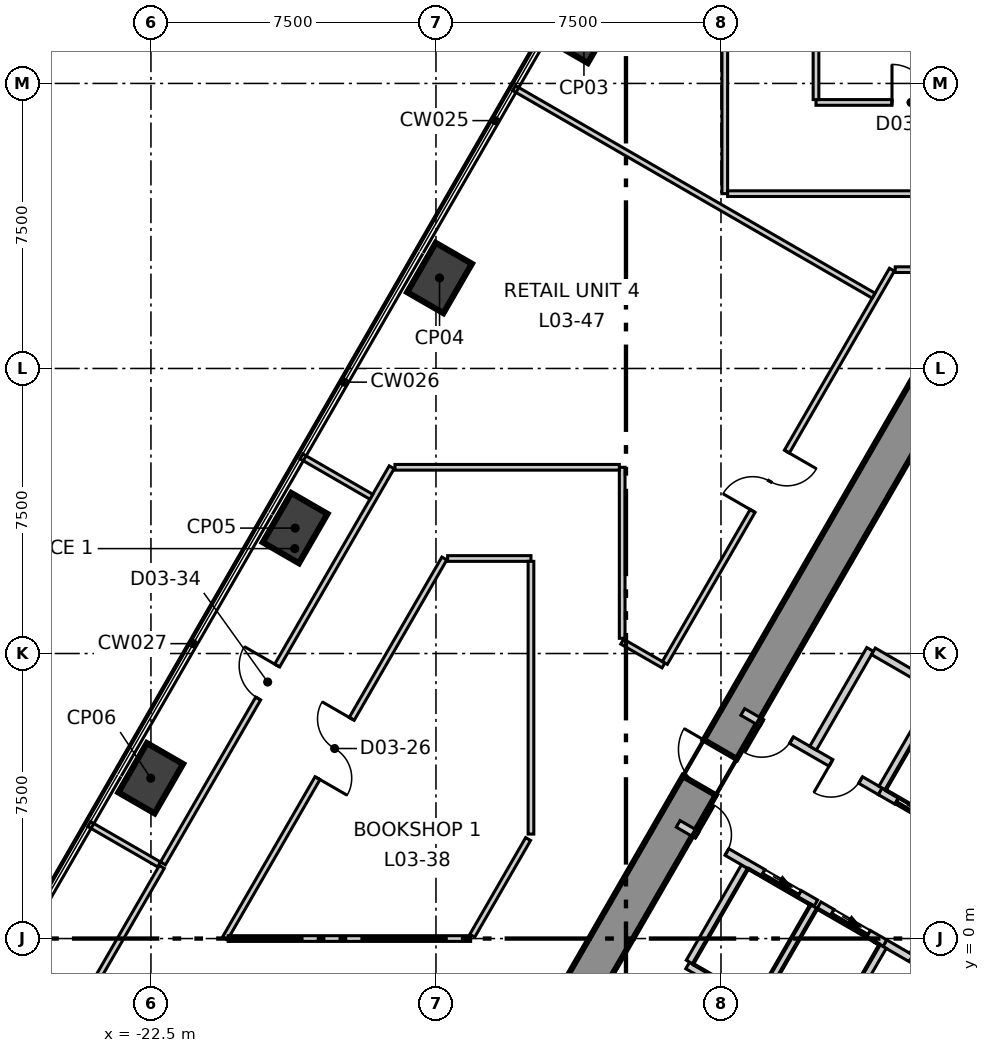
"""IFC4 building model, lengths in metres.
Left out: names, types, materials, properties, quantities, classifications, styles, units other than length and angle.
Written with IfcOpenShell. Run it as: python <this file> out.ifc"""

import sys

from ifc_helpers import new_model, si_unit, direction, frame, frame_2d, origin, origin_2d, place, context, subcontext, project, spatial, polyline, rectangle, outline, extrude, element, fill, save


model = new_model("IFC4")
c1 = context("Model", 3, precision=1e-05, world=origin(), true_north=direction((0.0, 1.0)))
c2 = subcontext(c1, "Body", "Model", "MODEL_VIEW")
j1 = project(units=[si_unit("LENGTHUNIT", "METRE"), si_unit("PLANEANGLEUNIT", "RADIAN")], contexts=[c1])
p1 = place(None, origin())
s1 = spatial("IfcSite", under=j1, at=p1, CompositionType="ELEMENT")
p2 = place(p1, origin())
s2 = spatial("IfcBuilding", under=s1, at=p2, CompositionType="ELEMENT")
p3 = place(p2, frame((0.0, 0.0, 19.9)))
s3 = spatial("IfcBuildingStorey", under=s2, at=p3, CompositionType="ELEMENT", Elevation=19.9)
p4 = place(p3, frame((-1.617, 15.2, -0.4), z_axis=(0.0, 0.0, 1.0), x_axis=(-0.499992141631, -0.866029940768, 0.0)))
e1 = element("IfcWall", 1, at=p4, inside=s3, PredefinedType="SHEAR", context=c2, shape_type="SweptSolid", body=[
    extrude(outline(polyline([(-0.289, -0.499), (1.656, -0.499), (3.601, -0.499), (5.547, -0.499), (7.492, -0.499), (9.437, -0.5), (11.382, -0.5), (13.328, -0.5), (15.273, -0.5), (17.218, -0.5), (19.163, -0.5), (21.109, -0.5), (23.054, -0.5), (24.999, -0.5), (24.422, 0.5), (22.566, 0.5), (20.709, 0.5), (18.853, 0.5), (16.997, 0.5), (15.14, 0.5), (13.284, 0.5), (11.427, 0.5), (9.571, 0.5), (7.715, 0.5), (5.858, 0.5), (4.002, 0.5), (2.146, 0.5), (0.289, 0.5), (-0.289, -0.499)])), origin(), (0.0, 0.0, 1.0), 5.4),
])
p5 = place(p4, frame((11.805, 0.0, 0.4)))
e2 = element("IfcOpeningElement", 2, at=p5, cuts=e1, PredefinedType="OPENING", context=c2, shape_type="SweptSolid", body=[
    extrude(rectangle(XDim=1.1, YDim=2.1, at=frame_2d((0.55, 1.05))), frame((0.0, 0.51, 0.0), z_axis=(0.0, -1.0, 0.0), x_axis=(1.0, 0.0, 0.0)), (0.0, 0.0, 1.0), 1.02),
])
for number, where, z_axis, x_axis in (
    (3, (-11.106, 23.962, -0.4), (0.0, 0.0, 1.0), (0.5, 0.866, 0.0)),
    (4, (-14.906, 17.381, -0.4), (0.0, 0.0, 1.0), (0.5, 0.866, 0.0)),
    (5, (-18.706, 10.8, -0.4), (0.0, 0.0, 1.0), (0.5, 0.866, 0.0)),
    (6, (-22.506, 4.219, -0.4), (0.0, 0.0, 1.0), (0.5, 0.866, 0.0)),
):
    element("IfcColumn", number, at=place(p3, frame(where, z_axis=z_axis, x_axis=x_axis)), inside=s3, PredefinedType="COLUMN", context=c2, shape_type="SweptSolid", body=[
        extrude(rectangle(XDim=1.5, YDim=1.1, at=origin_2d()), origin(), (0.0, 0.0, 1.0), 5.4),
    ])
p6 = place(p3, frame((-24.462, -2.01, 0.0), z_axis=(0.0, 0.0, 1.0), x_axis=(0.499835244236, 0.866120504675, 0.0)))
e7 = element("IfcWall", 7, at=p6, inside=s3, PredefinedType="PARTITIONING", context=c2, shape_type="SweptSolid", body=[
    extrude(rectangle(XDim=4.497, YDim=0.15, at=frame_2d((2.249, 0.0))), origin(), (0.0, 0.0, 1.0), 5.0),
])
p7 = place(p3, frame((-24.126, 3.012, 0.0), z_axis=(0.0, 0.0, 1.0), x_axis=(0.86609948408, -0.499871667208, 0.0)))
e8 = element("IfcWall", 8, at=p7, inside=s3, PredefinedType="PARTITIONING", context=c2, shape_type="SweptSolid", body=[
    extrude(rectangle(XDim=2.125, YDim=0.15, at=frame_2d((1.062, 0.0))), origin(), (0.0, 0.0, 1.0), 5.0),
])
p8 = place(p3, frame((-22.184, 1.977, 0.0), z_axis=(0.0, 0.0, 1.0), x_axis=(0.500026811154, 0.866009923804, 0.0)))
e9 = element("IfcWall", 9, at=p8, inside=s3, PredefinedType="PARTITIONING", context=c2, shape_type="SweptSolid", body=[
    extrude(rectangle(XDim=12.035, YDim=0.15, at=frame_2d((6.018, 0.0))), origin(), (0.0, 0.0, 1.0), 5.0),
])
p9 = place(p8, frame((5.011, 0.0, 0.0)))
e10 = element("IfcOpeningElement", 10, at=p9, cuts=e9, PredefinedType="OPENING", context=c2, shape_type="SweptSolid", body=[
    extrude(rectangle(XDim=1.0, YDim=2.1, at=frame_2d((0.5, 1.05))), frame((0.0, 0.085, 0.0), z_axis=(0.0, -1.0, 0.0), x_axis=(1.0, 0.0, 0.0)), (0.0, 0.0, 1.0), 0.17),
])
p10 = place(p3, frame((-18.541, 12.687, 0.0), z_axis=(0.0, 0.0, 1.0), x_axis=(0.866015377534, -0.500017365573, 0.0)))
e11 = element("IfcWall", 11, at=p10, inside=s3, PredefinedType="PARTITIONING", context=c2, shape_type="SweptSolid", body=[
    extrude(rectangle(XDim=2.126, YDim=0.15, at=frame_2d((1.063, 0.0))), origin(), (0.0, 0.0, 1.0), 5.0),
])
p11 = place(p3, frame((-10.1, 7.813, 0.0), z_axis=(0.0, 0.0, 1.0), x_axis=(0.866415685352, -0.499323402392, 0.0)))
e12 = element("IfcWall", 12, at=p11, inside=s3, PredefinedType="PARTITIONING", context=c2, shape_type="SweptSolid", body=[
    extrude(rectangle(XDim=1.254, YDim=0.15, at=frame_2d((0.627, 0.0))), origin(), (0.0, 0.0, 1.0), 5.0),
])
p12 = place(p3, frame((-8.977, 7.252, 0.0), z_axis=(0.0, 0.0, 1.0), x_axis=(0.500037258536, 0.86600389149, 0.0)))
e13 = element("IfcWall", 13, at=p12, inside=s3, PredefinedType="PARTITIONING", context=c2, shape_type="SweptSolid", body=[
    extrude(rectangle(XDim=11.949, YDim=0.15, at=frame_2d((5.975, 0.0))), origin(), (0.0, 0.0, 1.0), 5.0),
])
p13 = place(p12, frame((4.62, 0.0, 0.0)))
e14 = element("IfcOpeningElement", 14, at=p13, cuts=e13, PredefinedType="OPENING", context=c2, shape_type="SweptSolid", body=[
    extrude(rectangle(XDim=1.8, YDim=2.1, at=frame_2d((0.9, 1.05))), frame((0.0, 0.085, 0.0), z_axis=(0.0, -1.0, 0.0), x_axis=(1.0, 0.0, 0.0)), (0.0, 0.0, 1.0), 0.17),
])
p14 = place(p3, frame((-10.1, 7.9, 0.0), z_axis=(0.0, 0.0, 1.0), x_axis=(0.0, 1.0, 0.0)))
e15 = element("IfcWall", 15, at=p14, inside=s3, PredefinedType="PARTITIONING", context=c2, shape_type="SweptSolid", body=[
    extrude(rectangle(XDim=4.5, YDim=0.15, at=frame_2d((2.25, 0.0))), origin(), (0.0, 0.0, 1.0), 5.0),
])
p15 = place(p3, frame((-16.079, 12.4, 0.0), z_axis=(0.0, 0.0, 1.0), x_axis=(1.0, 0.0, 0.0)))
e16 = element("IfcWall", 16, at=p15, inside=s3, PredefinedType="PARTITIONING", context=c2, shape_type="SweptSolid", body=[
    extrude(rectangle(XDim=5.904, YDim=0.15, at=frame_2d((2.952, 0.0))), origin(), (0.0, 0.0, 1.0), 5.0),
])
p16 = place(p3, frame((-12.945, 22.378, 0.0), z_axis=(0.0, 0.0, 1.0), x_axis=(0.866045288938, -0.499965556321, 0.0)))
e17 = element("IfcWall", 17, at=p16, inside=s3, PredefinedType="PARTITIONING", context=c2, shape_type="SweptSolid", body=[
    extrude(rectangle(XDim=10.925, YDim=0.15, at=frame_2d((5.462, 0.0))), origin(), (0.0, 0.0, 1.0), 5.0),
])
p17 = place(p3, frame((-7.4, 19.6, 0.0), z_axis=(0.0, 0.0, 1.0), x_axis=(0.0, 1.0, 0.0)))
e18 = element("IfcWall", 18, at=p17, inside=s3, PredefinedType="PARTITIONING", context=c2, shape_type="SweptSolid", body=[
    extrude(rectangle(XDim=7.832, YDim=0.15, at=frame_2d((3.916, 0.0))), origin(), (0.0, 0.0, 1.0), 5.0),
])
p18 = place(p3, frame((-7.325, 19.6, 0.0), z_axis=(0.0, 0.0, 1.0), x_axis=(1.0, 0.0, 0.0)))
e19 = element("IfcWall", 19, at=p18, inside=s3, PredefinedType="PARTITIONING", context=c2, shape_type="SweptSolid", body=[
    extrude(rectangle(XDim=15.344, YDim=0.15, at=frame_2d((7.672, 0.0))), origin(), (0.0, 0.0, 1.0), 5.0),
])
p19 = place(p18, frame((7.135, 0.0, 0.0)))
e20 = element("IfcOpeningElement", 20, at=p19, cuts=e19, PredefinedType="OPENING", context=c2, shape_type="SweptSolid", body=[
    extrude(rectangle(XDim=1.0, YDim=2.1, at=frame_2d((0.5, 1.05))), frame((0.0, 0.085, 0.0), z_axis=(0.0, -1.0, 0.0), x_axis=(1.0, 0.0, 0.0)), (0.0, 0.0, 1.0), 0.17),
])
p20 = place(p3, frame((-2.916, 17.6, 0.0), z_axis=(0.0, 0.0, 1.0), x_axis=(1.0, 0.0, 0.0)))
e21 = element("IfcWall", 21, at=p20, inside=s3, PredefinedType="PARTITIONING", context=c2, shape_type="SweptSolid", body=[
    extrude(rectangle(XDim=5.832, YDim=0.15, at=frame_2d((2.916, 0.0))), origin(), (0.0, 0.0, 1.0), 5.0),
])
p21 = place(p3, frame((-5.0, 22.0, 0.0), z_axis=(0.0, 0.0, 1.0), x_axis=(1.0, 0.0, 0.0)))
e22 = element("IfcWall", 22, at=p21, inside=s3, PredefinedType="PARTITIONING", context=c2, shape_type="SweptSolid", body=[
    extrude(rectangle(XDim=10.925, YDim=0.15, at=frame_2d((5.462, 0.0))), origin(), (0.0, 0.0, 1.0), 5.0),
])
p22 = place(p21, frame((2.0, 0.0, 0.0)))
e23 = element("IfcOpeningElement", 23, at=p22, cuts=e22, PredefinedType="OPENING", context=c2, shape_type="SweptSolid", body=[
    extrude(rectangle(XDim=1.0, YDim=2.1, at=frame_2d((0.5, 1.05))), frame((0.0, 0.085, 0.0), z_axis=(0.0, -1.0, 0.0), x_axis=(1.0, 0.0, 0.0)), (0.0, 0.0, 1.0), 0.17),
])
p23 = place(p21, frame((7.5, 0.0, 0.0)))
e24 = element("IfcOpeningElement", 24, at=p23, cuts=e22, PredefinedType="OPENING", context=c2, shape_type="SweptSolid", body=[
    extrude(rectangle(XDim=1.0, YDim=2.1, at=frame_2d((0.5, 1.05))), frame((0.0, 0.085, 0.0), z_axis=(0.0, -1.0, 0.0), x_axis=(1.0, 0.0, 0.0)), (0.0, 0.0, 1.0), 0.17),
])
p24 = place(p3, frame((-5.0, 22.075, 0.0), z_axis=(0.0, 0.0, 1.0), x_axis=(0.0, 1.0, 0.0)))
e25 = element("IfcWall", 25, at=p24, inside=s3, PredefinedType="PARTITIONING", context=c2, shape_type="SweptSolid", body=[
    extrude(rectangle(XDim=4.864, YDim=0.15, at=frame_2d((2.432, 0.0))), origin(), (0.0, 0.0, 1.0), 4.25),
])
p25 = place(p3, frame((-20.554, 0.0, 0.0), z_axis=(0.0, 0.0, 1.0), x_axis=(0.500027479704, 0.866009537788, 0.0)))
e26 = element("IfcWall", 26, at=p25, inside=s3, PredefinedType="PARTITIONING", context=c2, shape_type="SweptSolid", body=[
    extrude(rectangle(XDim=11.547, YDim=0.15, at=frame_2d((5.773, 0.0))), origin(), (0.0, 0.0, 1.0), 5.0),
])
p26 = place(p25, frame((4.874, 0.0, 0.0)))
e27 = element("IfcOpeningElement", 27, at=p26, cuts=e26, PredefinedType="OPENING", context=c2, shape_type="SweptSolid", body=[
    extrude(rectangle(XDim=1.8, YDim=2.1, at=frame_2d((0.9, 1.05))), frame((0.0, 0.085, 0.0), z_axis=(0.0, -1.0, 0.0), x_axis=(1.0, 0.0, 0.0)), (0.0, 0.0, 1.0), 0.17),
])
p27 = place(p3, frame((-20.467, 0.0, 0.0), z_axis=(0.0, 0.0, 1.0), x_axis=(1.0, 0.0, 0.0)))
e28 = element("IfcWall", 28, at=p27, inside=s3, PredefinedType="PARTITIONING", context=c2, shape_type="SweptSolid", body=[
    extrude(rectangle(XDim=6.38, YDim=0.15, at=frame_2d((3.19, 0.0))), origin(), (0.0, 0.0, 1.0), 5.0),
])
p28 = place(p3, frame((-14.693, 10.0, 0.0), z_axis=(0.0, 0.0, 1.0), x_axis=(1.0, 0.0, 0.0)))
e29 = element("IfcWall", 29, at=p28, inside=s3, PredefinedType="PARTITIONING", context=c2, shape_type="SweptSolid", body=[
    extrude(rectangle(XDim=2.193, YDim=0.15, at=frame_2d((1.097, 0.0))), origin(), (0.0, 0.0, 1.0), 5.0),
])
p29 = place(p3, frame((-12.5, 2.749, 0.0), z_axis=(0.0, 0.0, 1.0), x_axis=(0.0, 1.0, 0.0)))
e30 = element("IfcWall", 30, at=p29, inside=s3, PredefinedType="PARTITIONING", context=c2, shape_type="SweptSolid", body=[
    extrude(rectangle(XDim=7.176, YDim=0.15, at=frame_2d((3.588, 0.0))), origin(), (0.0, 0.0, 1.0), 5.0),
])
p30 = place(p3, frame((-14.044, 0.075, 0.0), z_axis=(0.0, 0.0, 1.0), x_axis=(0.500062965414, 0.865989047634, 0.0)))
e31 = element("IfcWall", 31, at=p30, inside=s3, PredefinedType="PARTITIONING", context=c2, shape_type="SweptSolid", body=[
    extrude(rectangle(XDim=2.938, YDim=0.15, at=frame_2d((1.469, 0.0))), origin(), (0.0, 0.0, 1.0), 5.0),
])
p31 = place(p3, frame((-8.376, -0.707, 0.0), z_axis=(0.0, 0.0, 1.0), x_axis=(0.866067520717, -0.499927044236, 0.0)))
e32 = element("IfcWall", 32, at=p31, inside=s3, PredefinedType="SOLIDWALL", context=c2, shape_type="SweptSolid", body=[
    extrude(rectangle(XDim=2.1, YDim=0.2, at=frame_2d((1.05, 0.0))), origin(), (0.0, 0.0, 1.0), 5.0),
])
p32 = place(p3, frame((-8.326, -0.62, 0.0), z_axis=(0.0, 0.0, 1.0), x_axis=(0.500023687443, 0.866011727401, 0.0)))
e33 = element("IfcWall", 33, at=p32, inside=s3, PredefinedType="SOLIDWALL", context=c2, shape_type="SweptSolid", body=[
    extrude(rectangle(XDim=2.9, YDim=0.2, at=frame_2d((1.45, 0.0))), origin(), (0.0, 0.0, 1.0), 5.0),
])
p33 = place(p3, frame((-8.627, 3.018, 0.0), z_axis=(0.0, 0.0, 1.0), x_axis=(0.866039775641, -0.499975106388, 0.0)))
e34 = element("IfcWall", 34, at=p33, inside=s3, PredefinedType="SOLIDWALL", context=c2, shape_type="SweptSolid", body=[
    extrude(rectangle(XDim=4.182, YDim=0.2, at=frame_2d((2.091, 0.0))), origin(), (0.0, 0.0, 1.0), 5.0),
])
p34 = place(p33, frame((2.58, 0.0, 0.0)))
e35 = element("IfcOpeningElement", 35, at=p34, cuts=e34, PredefinedType="OPENING", context=c2, shape_type="SweptSolid", body=[
    extrude(rectangle(XDim=1.1, YDim=2.1, at=frame_2d((0.55, 1.05))), frame((0.0, 0.11, 0.0), z_axis=(0.0, -1.0, 0.0), x_axis=(1.0, 0.0, 0.0)), (0.0, 0.0, 1.0), 0.22),
])
p35 = place(p33, frame((0.58, 0.0, 0.0)))
e36 = element("IfcOpeningElement", 36, at=p35, cuts=e34, PredefinedType="OPENING", context=c2, shape_type="SweptSolid", body=[
    extrude(rectangle(XDim=0.9, YDim=2.1, at=frame_2d((0.45, 1.05))), frame((0.0, 0.11, 0.0), z_axis=(0.0, -1.0, 0.0), x_axis=(1.0, 0.0, 0.0)), (0.0, 0.0, 1.0), 0.22),
])
p36 = place(p3, frame((-3.188, -0.122, 0.0), z_axis=(0.0, 0.0, 1.0), x_axis=(0.865705793592, -0.50055317294, 0.0)))
e37 = element("IfcWall", 37, at=p36, inside=s3, PredefinedType="SOLIDWALL", context=c2, shape_type="SweptSolid", body=[
    extrude(rectangle(XDim=0.797, YDim=0.2, at=frame_2d((0.398, 0.0))), origin(), (0.0, 0.0, 1.0), 5.0),
])
p37 = place(p3, frame((-6.927, 5.962, 0.0), z_axis=(0.0, 0.0, 1.0), x_axis=(0.866065051207, -0.49993132236, 0.0)))
e38 = element("IfcWall", 38, at=p37, inside=s3, PredefinedType="SOLIDWALL", context=c2, shape_type="SweptSolid", body=[
    extrude(rectangle(XDim=4.182, YDim=0.2, at=frame_2d((2.091, 0.0))), origin(), (0.0, 0.0, 1.0), 5.0),
])
p38 = place(p37, frame((2.68, 0.0, 0.0)))
e39 = element("IfcOpeningElement", 39, at=p38, cuts=e38, PredefinedType="OPENING", context=c2, shape_type="SweptSolid", body=[
    extrude(rectangle(XDim=0.9, YDim=2.1, at=frame_2d((0.45, 1.05))), frame((0.0, 0.11, 0.0), z_axis=(0.0, -1.0, 0.0), x_axis=(1.0, 0.0, 0.0)), (0.0, 0.0, 1.0), 0.22),
])
p39 = place(p37, frame((0.58, 0.0, 0.0)))
e40 = element("IfcOpeningElement", 40, at=p39, cuts=e38, PredefinedType="OPENING", context=c2, shape_type="SweptSolid", body=[
    extrude(rectangle(XDim=0.9, YDim=2.1, at=frame_2d((0.45, 1.05))), frame((0.0, 0.11, 0.0), z_axis=(0.0, -1.0, 0.0), x_axis=(1.0, 0.0, 0.0)), (0.0, 0.0, 1.0), 0.22),
])
p40 = place(p3, frame((-5.076, 5.009, 0.0), z_axis=(0.0, 0.0, 1.0), x_axis=(0.50002537861, 0.866010750942, 0.0)))
e41 = element("IfcWall", 41, at=p40, inside=s3, PredefinedType="SOLIDWALL", context=c2, shape_type="SweptSolid", body=[
    extrude(rectangle(XDim=3.0, YDim=0.2, at=frame_2d((1.5, 0.0))), origin(), (0.0, 0.0, 1.0), 5.0),
])
p41 = place(p3, frame((-3.489, 7.557, 0.0), z_axis=(0.0, 0.0, 1.0), x_axis=(0.866010750942, -0.50002537861, 0.0)))
e42 = element("IfcWall", 42, at=p41, inside=s3, PredefinedType="SOLIDWALL", context=c2, shape_type="SweptSolid", body=[
    extrude(rectangle(XDim=2.0, YDim=0.2, at=frame_2d((1.0, 0.0))), origin(), (0.0, 0.0, 1.0), 5.0),
])
p42 = place(p3, frame((-2.444, -0.433, 0.0), z_axis=(0.0, 0.0, 1.0), x_axis=(0.500035624827, 0.866004834804, 0.0)))
e43 = element("IfcWall", 43, at=p42, inside=s3, PredefinedType="SOLIDWALL", context=c2, shape_type="SweptSolid", body=[
    extrude(rectangle(XDim=3.194, YDim=0.2, at=frame_2d((1.597, 0.0))), origin(), (0.0, 0.0, 1.0), 5.0),
])
p43 = place(p3, frame((-6.507, -1.67, 0.0), z_axis=(0.0, 0.0, 1.0), x_axis=(0.50012328804, 0.865954211699, 0.0)))
e44 = element("IfcWall", 44, at=p43, inside=s3, PredefinedType="SOLIDWALL", context=c2, shape_type="SweptSolid", body=[
    extrude(rectangle(XDim=2.9, YDim=0.2, at=frame_2d((1.45, 0.0))), origin(), (0.0, 0.0, 1.0), 5.0),
])
p44 = place(p3, frame((-4.92, 0.878, 0.0), z_axis=(0.0, 0.0, 1.0), x_axis=(0.866010750942, -0.50002537861, 0.0)))
e45 = element("IfcWall", 45, at=p44, inside=s3, PredefinedType="SOLIDWALL", context=c2, shape_type="SweptSolid", body=[
    extrude(rectangle(XDim=2.0, YDim=0.2, at=frame_2d((1.0, 0.0))), origin(), (0.0, 0.0, 1.0), 5.0),
])
p45 = place(p44, frame((0.4, 0.0, 0.0)))
e46 = element("IfcOpeningElement", 46, at=p45, cuts=e45, PredefinedType="OPENING", context=c2, shape_type="SweptSolid", body=[
    extrude(rectangle(XDim=1.1, YDim=2.1, at=frame_2d((0.55, 1.05))), frame((0.0, 0.11, 0.0), z_axis=(0.0, -1.0, 0.0), x_axis=(1.0, 0.0, 0.0)), (0.0, 0.0, 1.0), 0.22),
])
p46 = place(p3, frame((-4.619, -2.6, 0.0), z_axis=(0.0, 0.0, 1.0), x_axis=(0.50009492287, 0.865970593103, 0.0)))
e47 = element("IfcWall", 47, at=p46, inside=s3, PredefinedType="SOLIDWALL", context=c2, shape_type="SweptSolid", body=[
    extrude(rectangle(XDim=2.761, YDim=0.2, at=frame_2d((1.381, 0.0))), origin(), (0.0, 0.0, 1.0), 5.0),
])
p47 = place(p3, frame((-3.309, 3.873, 0.0), z_axis=(0.0, 0.0, 1.0), x_axis=(0.866098583652, -0.499873227325, 0.0)))
e48 = element("IfcWall", 48, at=p47, inside=s3, PredefinedType="SOLIDWALL", context=c2, shape_type="SweptSolid", body=[
    extrude(rectangle(XDim=2.103, YDim=0.2, at=frame_2d((1.051, 0.0))), origin(), (0.0, 0.0, 1.0), 5.0),
])
p48 = place(p47, frame((0.502, 0.0, 0.0)))
e49 = element("IfcOpeningElement", 49, at=p48, cuts=e48, PredefinedType="OPENING", context=c2, shape_type="SweptSolid", body=[
    extrude(rectangle(XDim=1.1, YDim=2.1, at=frame_2d((0.55, 1.05))), frame((0.0, 0.11, 0.0), z_axis=(0.0, -1.0, 0.0), x_axis=(1.0, 0.0, 0.0)), (0.0, 0.0, 1.0), 0.22),
])
p49 = place(p3, frame((-3.257, 3.959, 0.0), z_axis=(0.0, 0.0, 1.0), x_axis=(0.50012328804, 0.865954211699, 0.0)))
e50 = element("IfcWall", 50, at=p49, inside=s3, PredefinedType="SOLIDWALL", context=c2, shape_type="SweptSolid", body=[
    extrude(rectangle(XDim=2.9, YDim=0.2, at=frame_2d((1.45, 0.0))), origin(), (0.0, 0.0, 1.0), 5.0),
])
p50 = place(p45, origin())
e51 = element("IfcDoor", 51, at=p50, inside=s3, OperationType="SLIDING_TO_LEFT", PredefinedType="DOOR", context=c2, shape_type="SweptSolid", body=[
    extrude(rectangle(XDim=1.1, YDim=2.1, at=frame_2d((0.55, 1.05))), frame((0.0, 0.025, 0.0), z_axis=(0.0, -1.0, 0.0), x_axis=(1.0, 0.0, 0.0)), (0.0, 0.0, 1.0), 0.05),
])
fill(e46, e51)
p51 = place(p48, origin())
e52 = element("IfcDoor", 52, at=p51, inside=s3, OperationType="SLIDING_TO_LEFT", PredefinedType="DOOR", context=c2, shape_type="SweptSolid", body=[
    extrude(rectangle(XDim=1.1, YDim=2.1, at=frame_2d((0.55, 1.05))), frame((0.0, 0.025, 0.0), z_axis=(0.0, -1.0, 0.0), x_axis=(1.0, 0.0, 0.0)), (0.0, 0.0, 1.0), 0.05),
])
fill(e49, e52)
p52 = place(p34, origin())
e53 = element("IfcDoor", 53, at=p52, inside=s3, OperationType="SLIDING_TO_LEFT", PredefinedType="DOOR", context=c2, shape_type="SweptSolid", body=[
    extrude(rectangle(XDim=1.1, YDim=2.1, at=frame_2d((0.55, 1.05))), frame((0.0, 0.025, 0.0), z_axis=(0.0, -1.0, 0.0), x_axis=(1.0, 0.0, 0.0)), (0.0, 0.0, 1.0), 0.05),
])
fill(e35, e53)
p53 = place(p38, origin())
e54 = element("IfcDoor", 54, at=p53, inside=s3, OperationType="SINGLE_SWING_LEFT", PredefinedType="DOOR", context=c2, shape_type="SweptSolid", body=[
    extrude(rectangle(XDim=0.9, YDim=2.1, at=frame_2d((0.45, 1.05))), frame((0.0, 0.025, 0.0), z_axis=(0.0, -1.0, 0.0), x_axis=(1.0, 0.0, 0.0)), (0.0, 0.0, 1.0), 0.05),
])
fill(e39, e54)
p54 = place(p26, origin())
e55 = element("IfcDoor", 55, at=p54, inside=s3, OperationType="DOUBLE_DOOR_SINGLE_SWING", PredefinedType="DOOR", context=c2, shape_type="SweptSolid", body=[
    extrude(rectangle(XDim=1.8, YDim=2.1, at=frame_2d((0.9, 1.05))), frame((0.0, 0.025, 0.0), z_axis=(0.0, -1.0, 0.0), x_axis=(1.0, 0.0, 0.0)), (0.0, 0.0, 1.0), 0.05),
])
fill(e27, e55)
p55 = place(p22, origin())
e56 = element("IfcDoor", 56, at=p55, inside=s3, OperationType="SINGLE_SWING_RIGHT", PredefinedType="DOOR", context=c2, shape_type="SweptSolid", body=[
    extrude(rectangle(XDim=1.0, YDim=2.1, at=frame_2d((0.5, 1.05))), frame((0.0, 0.025, 0.0), z_axis=(0.0, -1.0, 0.0), x_axis=(1.0, 0.0, 0.0)), (0.0, 0.0, 1.0), 0.05),
])
fill(e23, e56)
p56 = place(p9, origin())
e57 = element("IfcDoor", 57, at=p56, inside=s3, OperationType="SINGLE_SWING_LEFT", PredefinedType="DOOR", context=c2, shape_type="SweptSolid", body=[
    extrude(rectangle(XDim=1.0, YDim=2.1, at=frame_2d((0.5, 1.05))), frame((0.0, 0.025, 0.0), z_axis=(0.0, -1.0, 0.0), x_axis=(1.0, 0.0, 0.0)), (0.0, 0.0, 1.0), 0.05),
])
fill(e10, e57)
p57 = place(p13, origin())
e58 = element("IfcDoor", 58, at=p57, inside=s3, OperationType="DOUBLE_DOOR_SINGLE_SWING", PredefinedType="DOOR", context=c2, shape_type="SweptSolid", body=[
    extrude(rectangle(XDim=1.8, YDim=2.1, at=frame_2d((0.9, 1.05))), frame((0.0, 0.025, 0.0), z_axis=(0.0, -1.0, 0.0), x_axis=(1.0, 0.0, 0.0)), (0.0, 0.0, 1.0), 0.05),
])
fill(e14, e58)
p58 = place(p5, origin())
e59 = element("IfcDoor", 59, at=p58, inside=s3, OperationType="SINGLE_SWING_LEFT", PredefinedType="DOOR", context=c2, shape_type="SweptSolid", body=[
    extrude(rectangle(XDim=1.1, YDim=2.1, at=frame_2d((0.55, 1.05))), frame((0.0, 0.025, 0.0), z_axis=(0.0, -1.0, 0.0), x_axis=(1.0, 0.0, 0.0)), (0.0, 0.0, 1.0), 0.05),
])
fill(e2, e59)
p59 = place(p35, origin())
e60 = element("IfcDoor", 60, at=p59, inside=s3, OperationType="SINGLE_SWING_RIGHT", PredefinedType="DOOR", context=c2, shape_type="SweptSolid", body=[
    extrude(rectangle(XDim=0.9, YDim=2.1, at=frame_2d((0.45, 1.05))), frame((0.0, 0.025, 0.0), z_axis=(0.0, -1.0, 0.0), x_axis=(1.0, 0.0, 0.0)), (0.0, 0.0, 1.0), 0.05),
])
fill(e36, e60)
p60 = place(p39, origin())
e61 = element("IfcDoor", 61, at=p60, inside=s3, OperationType="SINGLE_SWING_LEFT", PredefinedType="DOOR", context=c2, shape_type="SweptSolid", body=[
    extrude(rectangle(XDim=0.9, YDim=2.1, at=frame_2d((0.45, 1.05))), frame((0.0, 0.025, 0.0), z_axis=(0.0, -1.0, 0.0), x_axis=(1.0, 0.0, 0.0)), (0.0, 0.0, 1.0), 0.05),
])
fill(e40, e61)
save(model, sys.argv[1])
